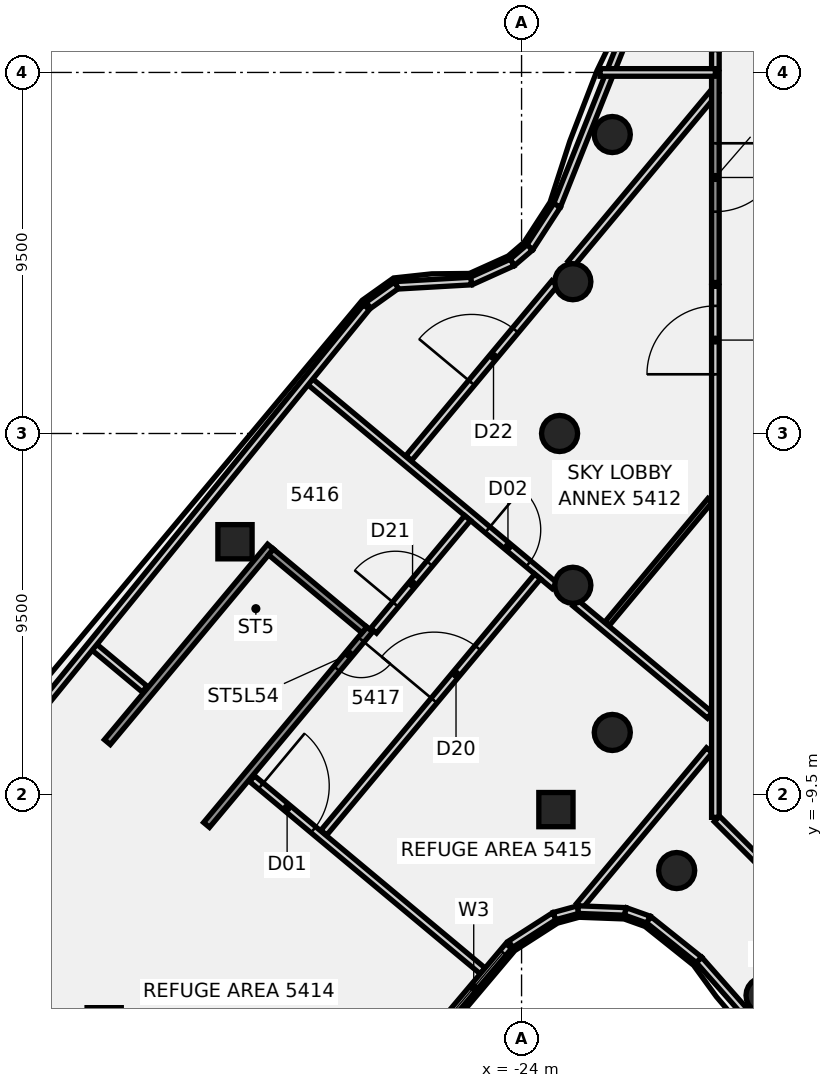
"""IFC4 building model, lengths in metres.
Left out: names, types, materials, properties, quantities, classifications, styles, units other than length and angle.
Written with IfcOpenShell. Run it as: python <this file> out.ifc"""

import sys

from ifc_helpers import new_model, si_unit, direction, frame, frame_2d, origin, origin_2d, place, context, subcontext, project, spatial, polyline, rectangle, circle, outline, extrude, element, fill, save


model = new_model("IFC4")
c1 = context("Model", 3, precision=1e-05, world=origin(), true_north=direction((0.0, 1.0)))
c2 = subcontext(c1, "Body", "Model", "MODEL_VIEW")
j1 = project(units=[si_unit("LENGTHUNIT", "METRE"), si_unit("PLANEANGLEUNIT", "RADIAN")], contexts=[c1])
p1 = place(None, origin())
s1 = spatial("IfcSite", under=j1, at=p1, CompositionType="ELEMENT")
p2 = place(p1, origin())
s2 = spatial("IfcBuilding", under=s1, at=p2, CompositionType="ELEMENT")
p3 = place(p2, frame((0.0, 0.0, 214.9)))
s3 = spatial("IfcBuildingStorey", under=s2, at=p3, CompositionType="ELEMENT", Elevation=214.9)
for number, where, z_axis, x_axis in (
    (1, (-21.613, 7.866, -0.18), (0.0, 0.0, 1.0), (1.0, 0.0, 0.0)),
    (2, (-22.651, 3.994, -0.18), (0.0, 0.0, 1.0), (1.0, 0.0, 0.0)),
    (3, (-23.0, 0.0, -0.18), (0.0, 0.0, 1.0), (1.0, 0.0, 0.0)),
    (4, (-22.651, -3.994, -0.18), (0.0, 0.0, 1.0), (1.0, 0.0, 0.0)),
    (5, (-21.613, -7.866, -0.18), (0.0, 0.0, 1.0), (1.0, 0.0, 0.0)),
    (6, (-19.919, -11.5, -0.18), (0.0, 0.0, 1.0), (1.0, 0.0, 0.0)),
    (7, (-17.619, -14.784, -0.18), (0.0, 0.0, 1.0), (1.0, 0.0, 0.0)),
):
    element("IfcColumn", number, at=place(p3, frame(where, z_axis=z_axis, x_axis=x_axis)), inside=s3, PredefinedType="COLUMN", context=c2, shape_type="SweptSolid", body=[
        extrude(circle(Radius=0.475, at=origin_2d()), origin(), (0.0, 0.0, 1.0), 5.04),
    ])
p4 = place(p3, frame((-23.096, -9.896, -0.174), z_axis=(0.03580550969, -0.00363877131, 0.999352152556), x_axis=(-0.767126989756, 0.640801875223, 0.029818422132)))
e8 = element("IfcColumn", 8, at=p4, inside=s3, PredefinedType="COLUMN", context=c2, shape_type="SweptSolid", body=[
    extrude(rectangle(XDim=0.9, YDim=0.9, at=origin_2d()), origin(), (0.0, 0.0, 1.0), 5.032),
])
p5 = place(p3, frame((-31.541, -2.848, -0.174), z_axis=(0.010576183279, -0.034396852958, 0.999352290663), x_axis=(0.641560817298, 0.766821630693, 0.019603683576)))
e9 = element("IfcColumn", 9, at=p5, inside=s3, PredefinedType="COLUMN", context=c2, shape_type="SweptSolid", body=[
    extrude(rectangle(XDim=0.9, YDim=0.9, at=origin_2d()), origin(), (0.0, 0.0, 1.0), 5.032),
])
p6 = place(p3, frame((-34.983, -15.557, -0.164), z_axis=(0.127416086189, 0.042488122715, 0.990938898423), x_axis=(-0.763161584743, 0.642340953018, 0.070586795141)))
e10 = element("IfcColumn", 10, at=p6, inside=s3, PredefinedType="COLUMN", context=c2, shape_type="SweptSolid", body=[
    extrude(rectangle(XDim=0.9, YDim=0.9, at=origin_2d()), origin(), (0.0, 0.0, 1.0), 5.057),
])
p7 = place(p3, frame((-18.858, -10.142, 0.0), z_axis=(0.0, 0.0, 1.0), x_axis=(0.707106781187, -0.707106781187, 0.0)))
e11 = element("IfcWall", 11, at=p7, inside=s3, PredefinedType="PARTITIONING", context=c2, shape_type="SweptSolid", body=[
    extrude(rectangle(XDim=2.426, YDim=0.2, at=frame_2d((1.213, 0.0))), origin(), (0.0, 0.0, 1.0), 4.16),
])
p8 = place(p3, frame((-35.345, -5.535, 0.0), z_axis=(0.0, 0.0, 1.0), x_axis=(0.767995139873, -0.640455669919, 0.0)))
e12 = element("IfcWall", 12, at=p8, inside=s3, PredefinedType="PARTITIONING", context=c2, shape_type="SweptSolid", body=[
    extrude(rectangle(XDim=1.859, YDim=0.2, at=frame_2d((0.929, 0.0))), origin(), (0.0, 0.0, 1.0), 4.16),
])
p9 = place(p3, frame((-31.091, -9.082, 0.0), z_axis=(0.0, 0.0, 1.0), x_axis=(0.768028712012, -0.640415410125, 0.0)))
e13 = element("IfcWall", 13, at=p9, inside=s3, PredefinedType="PARTITIONING", context=c2, shape_type="SweptSolid", body=[
    extrude(rectangle(XDim=7.899, YDim=0.2, at=frame_2d((3.95, 0.0))), origin(), (0.0, 0.0, 1.0), 4.16),
])
p10 = place(p9, frame((0.3, 0.0, 0.0)))
e14 = element("IfcOpeningElement", 14, at=p10, cuts=e13, PredefinedType="OPENING", context=c2, shape_type="SweptSolid", body=[
    extrude(rectangle(XDim=1.8, YDim=2.1, at=frame_2d((0.9, 1.05))), frame((0.0, 0.11, 0.0), z_axis=(0.0, -1.0, 0.0), x_axis=(1.0, 0.0, 0.0)), (0.0, 0.0, 1.0), 0.22),
])
p11 = place(p3, frame((-29.578, 1.375, 0.0), z_axis=(0.0, 0.0, 1.0), x_axis=(0.767770502141, -0.6407249457, 0.0)))
e15 = element("IfcWall", 15, at=p11, inside=s3, PredefinedType="PARTITIONING", context=c2, shape_type="SweptSolid", body=[
    extrude(rectangle(XDim=8.394, YDim=0.2, at=frame_2d((4.197, 0.0))), origin(), (0.0, 0.0, 1.0), 4.16),
])
p12 = place(p11, frame((6.099, 0.0, 0.0)))
e16 = element("IfcOpeningElement", 16, at=p12, cuts=e15, PredefinedType="OPENING", context=c2, shape_type="SweptSolid", body=[
    extrude(rectangle(XDim=1.4, YDim=2.1, at=frame_2d((0.7, 1.05))), frame((0.0, 0.11, 0.0), z_axis=(0.0, -1.0, 0.0), x_axis=(1.0, 0.0, 0.0)), (0.0, 0.0, 1.0), 0.22),
])
p13 = place(p3, frame((-22.584, -4.461, 0.0), z_axis=(0.0, 0.0, 1.0), x_axis=(0.767782587274, -0.640710463999, 0.0)))
e17 = element("IfcWall", 17, at=p13, inside=s3, PredefinedType="PARTITIONING", context=c2, shape_type="SweptSolid", body=[
    extrude(rectangle(XDim=4.609, YDim=0.2, at=frame_2d((2.305, 0.0))), origin(), (0.0, 0.0, 1.0), 4.16),
])
p14 = place(p3, frame((-29.204, -10.504, 0.0), z_axis=(0.0, 0.0, 1.0), x_axis=(0.640742157365, 0.767756138221, 0.0)))
e18 = element("IfcWall", 18, at=p14, inside=s3, PredefinedType="PARTITIONING", context=c2, shape_type="SweptSolid", body=[
    extrude(rectangle(XDim=8.781, YDim=0.2, at=frame_2d((4.39, 0.0))), origin(), (0.0, 0.0, 1.0), 4.16),
])
p15 = place(p14, frame((4.53, 0.0, 0.0)))
e19 = element("IfcOpeningElement", 19, at=p15, cuts=e18, PredefinedType="OPENING", context=c2, shape_type="SweptSolid", body=[
    extrude(rectangle(XDim=1.8, YDim=2.1, at=frame_2d((0.9, 1.05))), frame((0.0, 0.11, 0.0), z_axis=(0.0, -1.0, 0.0), x_axis=(1.0, 0.0, 0.0)), (0.0, 0.0, 1.0), 0.22),
])
p16 = place(p3, frame((-27.894, -5.188, 0.0), z_axis=(0.0, 0.0, 1.0), x_axis=(0.640750333898, 0.767749314301, 0.0)))
e20 = element("IfcWall", 20, at=p16, inside=s3, PredefinedType="PARTITIONING", context=c2, shape_type="SweptSolid", body=[
    extrude(rectangle(XDim=3.86, YDim=0.2, at=frame_2d((1.93, 0.0))), origin(), (0.0, 0.0, 1.0), 4.16),
])
p17 = place(p16, frame((0.9, 0.0, 0.0)))
e21 = element("IfcOpeningElement", 21, at=p17, cuts=e20, PredefinedType="OPENING", context=c2, shape_type="SweptSolid", body=[
    extrude(rectangle(XDim=1.4, YDim=2.1, at=frame_2d((0.7, 1.05))), frame((0.0, 0.11, 0.0), z_axis=(0.0, -1.0, 0.0), x_axis=(1.0, 0.0, 0.0)), (0.0, 0.0, 1.0), 0.22),
])
p18 = place(p3, frame((-26.968, -0.647, 0.0), z_axis=(0.0, 0.0, 1.0), x_axis=(0.640736859204, 0.767760559847, 0.0)))
e22 = element("IfcWall", 22, at=p18, inside=s3, PredefinedType="PARTITIONING", context=c2, shape_type="SweptSolid", body=[
    extrude(rectangle(XDim=5.997, YDim=0.2, at=frame_2d((2.998, 0.0))), origin(), (0.0, 0.0, 1.0), 4.16),
])
p19 = place(p18, frame((2.58, 0.0, 0.0)))
e23 = element("IfcOpeningElement", 23, at=p19, cuts=e22, PredefinedType="OPENING", context=c2, shape_type="SweptSolid", body=[
    extrude(rectangle(XDim=1.8, YDim=2.1, at=frame_2d((0.9, 1.05))), frame((0.0, 0.11, 0.0), z_axis=(0.0, -1.0, 0.0), x_axis=(1.0, 0.0, 0.0)), (0.0, 0.0, 1.0), 0.22),
])
p20 = place(p3, frame((-22.701, 4.465, 0.0), z_axis=(0.0, 0.0, 1.0), x_axis=(0.640775177537, 0.767728579547, 0.0)))
e24 = element("IfcWall", 24, at=p20, inside=s3, PredefinedType="PARTITIONING", context=c2, shape_type="SweptSolid", body=[
    extrude(rectangle(XDim=5.933, YDim=0.2, at=frame_2d((2.966, 0.0))), origin(), (0.0, 0.0, 1.0), 4.16),
])
p21 = place(p3, frame((-22.473, -12.428, 0.0), z_axis=(0.0, 0.0, 1.0), x_axis=(0.640675113455, 0.767812085734, 0.0)))
e25 = element("IfcWall", 25, at=p21, inside=s3, PredefinedType="PARTITIONING", context=c2, shape_type="SweptSolid", body=[
    extrude(rectangle(XDim=5.333, YDim=0.2, at=frame_2d((2.667, 0.0))), origin(), (0.0, 0.0, 1.0), 4.16),
])
p22 = place(p3, frame((-21.748, -5.004, 0.0), z_axis=(0.0, 0.0, 1.0), x_axis=(0.640814436724, 0.767695810647, 0.0)))
e26 = element("IfcWall", 26, at=p22, inside=s3, PredefinedType="PARTITIONING", context=c2, shape_type="SweptSolid", body=[
    extrude(rectangle(XDim=4.229, YDim=0.15, at=frame_2d((2.115, 0.0))), origin(), (0.0, 0.0, 1.0), 4.16),
])
p23 = place(p3, frame((-18.9, -10.1, 0.0), z_axis=(0.0, 0.0, 1.0), x_axis=(0.0, 1.0, 0.0)))
e27 = element("IfcWall", 27, at=p23, inside=s3, PredefinedType="PARTITIONING", context=c2, shape_type="SweptSolid", body=[
    extrude(rectangle(XDim=13.973, YDim=0.2, at=frame_2d((6.986, 0.0))), origin(), (0.0, 0.0, 1.0), 4.16),
])
p24 = place(p23, frame((11.658, 0.0, 0.0)))
e28 = element("IfcOpeningElement", 28, at=p24, cuts=e27, PredefinedType="OPENING", context=c2, shape_type="SweptSolid", body=[
    extrude(rectangle(XDim=1.8, YDim=2.1, at=frame_2d((0.9, 1.05))), frame((0.0, 0.11, 0.0), z_axis=(0.0, -1.0, 0.0), x_axis=(1.0, 0.0, 0.0)), (0.0, 0.0, 1.0), 0.22),
])
p25 = place(p3, frame((-18.9, 9.6, 0.0), z_axis=(0.0, 0.0, 1.0), x_axis=(0.0, 1.0, 0.0)))
e29 = element("IfcWall", 29, at=p25, inside=s3, PredefinedType="PARTITIONING", context=c2, shape_type="SweptSolid", body=[
    extrude(rectangle(XDim=0.5, YDim=0.2, at=frame_2d((0.25, 0.0))), origin(), (0.0, 0.0, 1.0), 4.16),
])
p26 = place(p3, frame((-39.85, -13.687, 0.0), z_axis=(0.0, 0.0, 1.0), x_axis=(0.78216217296, -0.623074903355, 0.0)))
e30 = element("IfcWall", 30, at=p26, inside=s3, PredefinedType="SOLIDWALL", context=c2, shape_type="SweptSolid", body=[
    extrude(rectangle(XDim=10.833, YDim=0.2, at=frame_2d((5.417, 0.0))), origin(), (0.0, 0.0, 1.0), 4.86),
])
p27 = place(p26, frame((8.233, 0.0, 1.4)))
e31 = element("IfcOpeningElement", 31, at=p27, cuts=e30, PredefinedType="OPENING", context=c2, shape_type="SweptSolid", body=[
    extrude(rectangle(XDim=2.4, YDim=2.1, at=frame_2d((1.2, 1.05))), frame((0.0, 0.11, 0.0), z_axis=(0.0, -1.0, 0.0), x_axis=(1.0, 0.0, 0.0)), (0.0, 0.0, 1.0), 0.22),
])
p28 = place(p3, frame((-29.645, -19.772, 0.0), z_axis=(0.0, 0.0, 1.0), x_axis=(0.64498793917, 0.764192749459, 0.0)))
e32 = element("IfcWall", 32, at=p28, inside=s3, PredefinedType="SOLIDWALL", context=c2, shape_type="SweptSolid", body=[
    extrude(rectangle(XDim=8.227, YDim=0.2, at=frame_2d((4.114, 0.0))), origin(), (0.0, 0.0, 1.0), 4.86),
])
p29 = place(p28, frame((5.6, 0.0, 1.4)))
e33 = element("IfcOpeningElement", 33, at=p29, cuts=e32, PredefinedType="OPENING", context=c2, shape_type="SweptSolid", body=[
    extrude(rectangle(XDim=2.4, YDim=2.1, at=frame_2d((1.2, 1.05))), frame((0.0, 0.11, 0.0), z_axis=(0.0, -1.0, 0.0), x_axis=(1.0, 0.0, 0.0)), (0.0, 0.0, 1.0), 0.22),
])
p30 = place(p3, frame((-24.287, -13.438, 0.0), z_axis=(0.0, 0.0, 1.0), x_axis=(0.841444816205, 0.540343058881, 0.0)))
e34 = element("IfcWall", 34, at=p30, inside=s3, PredefinedType="SOLIDWALL", context=c2, shape_type="SweptSolid", body=[
    extrude(rectangle(XDim=1.369, YDim=0.2, at=frame_2d((0.685, 0.0))), origin(), (0.0, 0.0, 1.0), 4.86),
])
p31 = place(p3, frame((-23.135, -12.698, 0.0), z_axis=(0.0, 0.0, 1.0), x_axis=(0.964650465648, 0.263532690811, 0.0)))
e35 = element("IfcWall", 35, at=p31, inside=s3, PredefinedType="SOLIDWALL", context=c2, shape_type="SweptSolid", body=[
    extrude(rectangle(XDim=0.647, YDim=0.2, at=frame_2d((0.323, 0.0))), origin(), (0.0, 0.0, 1.0), 4.86),
])
p32 = place(p3, frame((-22.511, -12.528, 0.0), z_axis=(0.0, 0.0, 1.0), x_axis=(0.999291824477, -0.037627776093, 0.0)))
e36 = element("IfcWall", 36, at=p32, inside=s3, PredefinedType="SOLIDWALL", context=c2, shape_type="SweptSolid", body=[
    extrude(rectangle(XDim=1.246, YDim=0.2, at=frame_2d((0.623, 0.0))), origin(), (0.0, 0.0, 1.0), 4.86),
])
p33 = place(p3, frame((-21.266, -12.575, 0.0), z_axis=(0.0, 0.0, 1.0), x_axis=(0.9419797958, -0.335669576077, 0.0)))
e37 = element("IfcWall", 37, at=p33, inside=s3, PredefinedType="SOLIDWALL", context=c2, shape_type="SweptSolid", body=[
    extrude(rectangle(XDim=0.649, YDim=0.2, at=frame_2d((0.325, 0.0))), origin(), (0.0, 0.0, 1.0), 4.86),
])
p34 = place(p3, frame((-20.655, -12.793, 0.0), z_axis=(0.0, 0.0, 1.0), x_axis=(0.781177323264, -0.624309209942, 0.0)))
e38 = element("IfcWall", 38, at=p34, inside=s3, PredefinedType="SOLIDWALL", context=c2, shape_type="SweptSolid", body=[
    extrude(rectangle(XDim=1.698, YDim=0.2, at=frame_2d((0.849, 0.0))), origin(), (0.0, 0.0, 1.0), 4.86),
])
p35 = place(p3, frame((-19.328, -13.853, 0.0), z_axis=(0.0, 0.0, 1.0), x_axis=(0.661797193019, -0.749682916513, 0.0)))
e39 = element("IfcWall", 39, at=p35, inside=s3, PredefinedType="SOLIDWALL", context=c2, shape_type="SweptSolid", body=[
    extrude(rectangle(XDim=4.967, YDim=0.2, at=frame_2d((2.483, 0.0))), origin(), (0.0, 0.0, 1.0), 4.86),
])
p36 = place(p35, frame((2.05, 0.0, 1.4)))
e40 = element("IfcOpeningElement", 40, at=p36, cuts=e39, PredefinedType="OPENING", context=c2, shape_type="SweptSolid", body=[
    extrude(rectangle(XDim=2.4, YDim=2.1, at=frame_2d((1.2, 1.05))), frame((0.0, 0.11, 0.0), z_axis=(0.0, -1.0, 0.0), x_axis=(1.0, 0.0, 0.0)), (0.0, 0.0, 1.0), 0.22),
])
p37 = place(p3, frame((-20.976, 11.235, 0.0), z_axis=(0.0, 0.0, 1.0), x_axis=(-0.370957476811, -0.928649853496, 0.0)))
e41 = element("IfcWall", 41, at=p37, inside=s3, PredefinedType="SOLIDWALL", context=c2, shape_type="SweptSolid", body=[
    extrude(rectangle(XDim=5.636, YDim=0.2, at=frame_2d((2.818, 0.0))), origin(), (0.0, 0.0, 1.0), 4.86),
])
p38 = place(p3, frame((-23.067, 6.001, 0.0), z_axis=(0.0, 0.0, 1.0), x_axis=(-0.543951096274, -0.839116919662, 0.0)))
e42 = element("IfcWall", 42, at=p38, inside=s3, PredefinedType="SOLIDWALL", context=c2, shape_type="SweptSolid", body=[
    extrude(rectangle(XDim=1.316, YDim=0.2, at=frame_2d((0.658, 0.0))), origin(), (0.0, 0.0, 1.0), 4.86),
])
p39 = place(p3, frame((-23.783, 4.897, 0.0), z_axis=(0.0, 0.0, 1.0), x_axis=(-0.758719364192, -0.651417628254, 0.0)))
e43 = element("IfcWall", 43, at=p39, inside=s3, PredefinedType="SOLIDWALL", context=c2, shape_type="SweptSolid", body=[
    extrude(rectangle(XDim=0.61, YDim=0.2, at=frame_2d((0.305, 0.0))), origin(), (0.0, 0.0, 1.0), 4.86),
])
p40 = place(p3, frame((-24.246, 4.5, 0.0), z_axis=(0.0, 0.0, 1.0), x_axis=(-0.911490011806, -0.411322207494, 0.0)))
e44 = element("IfcWall", 44, at=p40, inside=s3, PredefinedType="SOLIDWALL", context=c2, shape_type="SweptSolid", body=[
    extrude(rectangle(XDim=1.187, YDim=0.2, at=frame_2d((0.594, 0.0))), origin(), (0.0, 0.0, 1.0), 4.86),
])
p41 = place(p3, frame((-25.328, 4.011, 0.0), z_axis=(0.0, 0.0, 1.0), x_axis=(-0.998367905446, -0.057109766027, 0.0)))
e45 = element("IfcWall", 45, at=p41, inside=s3, PredefinedType="SOLIDWALL", context=c2, shape_type="SweptSolid", body=[
    extrude(rectangle(XDim=1.971, YDim=0.2, at=frame_2d((0.985, 0.0))), origin(), (0.0, 0.0, 1.0), 4.86),
])
p42 = place(p3, frame((-27.295, 3.899, 0.0), z_axis=(0.0, 0.0, 1.0), x_axis=(-0.814189379779, -0.580599391883, 0.0)))
e46 = element("IfcWall", 46, at=p42, inside=s3, PredefinedType="SOLIDWALL", context=c2, shape_type="SweptSolid", body=[
    extrude(rectangle(XDim=0.904, YDim=0.2, at=frame_2d((0.452, 0.0))), origin(), (0.0, 0.0, 1.0), 4.86),
])
p43 = place(p3, frame((-28.081, 3.326, 0.0), z_axis=(0.0, 0.0, 1.0), x_axis=(-0.631092649572, -0.775707462679, 0.0)))
e47 = element("IfcWall", 47, at=p43, inside=s3, PredefinedType="SOLIDWALL", context=c2, shape_type="SweptSolid", body=[
    extrude(rectangle(XDim=19.7, YDim=0.2, at=frame_2d((9.85, 0.0))), origin(), (0.0, 0.0, 1.0), 4.86),
])
p44 = place(p3, frame((-18.9, 9.5, 0.0), z_axis=(0.0, 0.0, 1.0), x_axis=(0.0, -1.0, 0.0)))
e48 = element("IfcWall", 48, at=p44, inside=s3, PredefinedType="SOLIDWALL", context=c2, shape_type="SweptSolid", body=[
    extrude(rectangle(XDim=5.527, YDim=0.2, at=frame_2d((2.764, 0.0))), origin(), (0.0, 0.0, 1.0), 4.364),
])
p45 = place(p44, frame((1.864, 0.0, 0.0)))
e49 = element("IfcOpeningElement", 49, at=p45, cuts=e48, PredefinedType="OPENING", context=c2, shape_type="SweptSolid", body=[
    extrude(rectangle(XDim=1.8, YDim=2.4, at=frame_2d((0.9, 1.2))), frame((0.0, 0.11, 0.0), z_axis=(0.0, -1.0, 0.0), x_axis=(1.0, 0.0, 0.0)), (0.0, 0.0, 1.0), 0.22),
])
p46 = place(p3, frame((-18.9, 9.5, 0.0), z_axis=(0.0, 0.0, 1.0), x_axis=(-1.0, 0.0, 0.0)))
e50 = element("IfcWall", 50, at=p46, inside=s3, PredefinedType="SOLIDWALL", context=c2, shape_type="SweptSolid", body=[
    extrude(rectangle(XDim=3.033, YDim=0.2, at=frame_2d((1.517, 0.0))), origin(), (0.0, 0.0, 1.0), 4.86),
])
p47 = place(p3, frame((-27.996, -5.155, -0.18), z_axis=(0.0, 0.0, 1.0), x_axis=(-0.640775593129, -0.767728232678, 0.0)))
e51 = element("IfcWall", 51, at=p47, inside=s3, PredefinedType="SHEAR", context=c2, shape_type="SweptSolid", body=[
    extrude(rectangle(XDim=6.7, YDim=0.2, at=frame_2d((3.35, 0.0))), origin(), (0.0, 0.0, 1.0), 4.444),
])
p48 = place(p47, frame((0.35, 0.0, 0.0)))
e52 = element("IfcOpeningElement", 52, at=p48, cuts=e51, PredefinedType="OPENING", context=c2, shape_type="SweptSolid", body=[
    extrude(rectangle(XDim=1.0, YDim=2.1, at=frame_2d((0.5, 1.05))), frame((0.0, 0.11, 0.0), z_axis=(0.0, -1.0, 0.0), x_axis=(1.0, 0.0, 0.0)), (0.0, 0.0, 1.0), 0.22),
])
p49 = place(p3, frame((-30.606, -2.977, -0.18), z_axis=(0.0, 0.0, 1.0), x_axis=(-0.640775593129, -0.767728232678, 0.0)))
e53 = element("IfcWall", 53, at=p49, inside=s3, PredefinedType="SHEAR", context=c2, shape_type="SweptSolid", body=[
    extrude(rectangle(XDim=6.7, YDim=0.2, at=frame_2d((3.35, 0.0))), origin(), (0.0, 0.0, 1.0), 4.444),
])
p50 = place(p3, frame((-30.594, -3.117, -0.18), z_axis=(0.0, 0.0, 1.0), x_axis=(0.767727028485, -0.640777035898, 0.0)))
e54 = element("IfcWall", 54, at=p50, inside=s3, PredefinedType="SHEAR", context=c2, shape_type="SweptSolid", body=[
    extrude(rectangle(XDim=3.2, YDim=0.2, at=frame_2d((1.6, 0.0))), origin(), (0.0, 0.0, 1.0), 4.444),
])
p51 = place(p3, frame((0.0, 0.0, -0.18)))
e55 = element("IfcWall", 55, at=p51, inside=s3, PredefinedType="SHEAR", context=c2, shape_type="SweptSolid", body=[
    extrude(outline(polyline([(-34.695, -8.031), (-34.823, -8.185), (-32.366, -10.235), (-32.238, -10.081), (-34.695, -8.031)])), origin(), (0.0, 0.0, 1.0), 4.444),
])
p52 = place(p10, frame((1.8, 0.0, 0.0), z_axis=(0.0, 0.0, 1.0), x_axis=(-1.0, 0.0, 0.0)))
e56 = element("IfcDoor", 56, at=p52, inside=s3, OperationType="DOUBLE_DOOR_SINGLE_SWING", PredefinedType="DOOR", context=c2, shape_type="SweptSolid", body=[
    extrude(rectangle(XDim=1.8, YDim=2.1, at=frame_2d((0.9, 1.05))), frame((0.0, 0.025, 0.0), z_axis=(0.0, -1.0, 0.0), x_axis=(1.0, 0.0, 0.0)), (0.0, 0.0, 1.0), 0.05),
])
fill(e14, e56)
p53 = place(p12, origin())
e57 = element("IfcDoor", 57, at=p53, inside=s3, OperationType="DOUBLE_DOOR_SINGLE_SWING", PredefinedType="DOOR", context=c2, shape_type="SweptSolid", body=[
    extrude(rectangle(XDim=1.4, YDim=2.1, at=frame_2d((0.7, 1.05))), frame((0.0, 0.025, 0.0), z_axis=(0.0, -1.0, 0.0), x_axis=(1.0, 0.0, 0.0)), (0.0, 0.0, 1.0), 0.05),
])
fill(e16, e57)
p54 = place(p15, frame((1.8, 0.0, 0.0), z_axis=(0.0, 0.0, 1.0), x_axis=(-1.0, 0.0, 0.0)))
e58 = element("IfcDoor", 58, at=p54, inside=s3, OperationType="DOUBLE_DOOR_SINGLE_SWING", PredefinedType="DOOR", context=c2, shape_type="SweptSolid", body=[
    extrude(rectangle(XDim=1.8, YDim=2.1, at=frame_2d((0.9, 1.05))), frame((0.0, 0.025, 0.0), z_axis=(0.0, -1.0, 0.0), x_axis=(1.0, 0.0, 0.0)), (0.0, 0.0, 1.0), 0.05),
])
fill(e19, e58)
p55 = place(p17, origin())
e59 = element("IfcDoor", 59, at=p55, inside=s3, OperationType="DOUBLE_DOOR_SINGLE_SWING", PredefinedType="DOOR", context=c2, shape_type="SweptSolid", body=[
    extrude(rectangle(XDim=1.4, YDim=2.1, at=frame_2d((0.7, 1.05))), frame((0.0, 0.025, 0.0), z_axis=(0.0, -1.0, 0.0), x_axis=(1.0, 0.0, 0.0)), (0.0, 0.0, 1.0), 0.05),
])
fill(e21, e59)
p56 = place(p19, origin())
e60 = element("IfcDoor", 60, at=p56, inside=s3, OperationType="DOUBLE_DOOR_SINGLE_SWING", PredefinedType="DOOR", context=c2, shape_type="SweptSolid", body=[
    extrude(rectangle(XDim=1.8, YDim=2.1, at=frame_2d((0.9, 1.05))), frame((0.0, 0.025, 0.0), z_axis=(0.0, -1.0, 0.0), x_axis=(1.0, 0.0, 0.0)), (0.0, 0.0, 1.0), 0.05),
])
fill(e23, e60)
p57 = place(p24, frame((1.8, 0.0, 0.0), z_axis=(0.0, 0.0, 1.0), x_axis=(-1.0, 0.0, 0.0)))
e61 = element("IfcDoor", 61, at=p57, inside=s3, OperationType="DOUBLE_DOOR_SINGLE_SWING", PredefinedType="DOOR", context=c2, shape_type="SweptSolid", body=[
    extrude(rectangle(XDim=1.8, YDim=2.1, at=frame_2d((0.9, 1.05))), frame((0.0, 0.025, 0.0), z_axis=(0.0, -1.0, 0.0), x_axis=(1.0, 0.0, 0.0)), (0.0, 0.0, 1.0), 0.05),
])
fill(e28, e61)
p58 = place(p29, origin())
e62 = element("IfcWindow", 62, at=p58, inside=s3, PartitioningType="SINGLE_PANEL", PredefinedType="WINDOW", context=c2, shape_type="SweptSolid", body=[
    extrude(rectangle(XDim=2.4, YDim=2.1, at=frame_2d((1.2, 1.05))), frame((0.0, 0.03, 0.0), z_axis=(0.0, -1.0, 0.0), x_axis=(1.0, 0.0, 0.0)), (0.0, 0.0, 1.0), 0.06),
])
fill(e33, e62)
p59 = place(p45, origin())
e63 = element("IfcDoor", 63, at=p59, inside=s3, OperationType="SINGLE_SWING_LEFT", PredefinedType="DOOR", context=c2, shape_type="SweptSolid", body=[
    extrude(rectangle(XDim=1.8, YDim=2.4, at=frame_2d((0.9, 1.2))), frame((0.0, 0.025, 0.0), z_axis=(0.0, -1.0, 0.0), x_axis=(1.0, 0.0, 0.0)), (0.0, 0.0, 1.0), 0.05),
])
fill(e49, e63)
p60 = place(p48, origin())
e64 = element("IfcDoor", 64, at=p60, inside=s3, OperationType="SINGLE_SWING_LEFT", PredefinedType="DOOR", context=c2, shape_type="SweptSolid", body=[
    extrude(rectangle(XDim=1.0, YDim=2.1, at=frame_2d((0.5, 1.05))), frame((0.0, 0.025, 0.0), z_axis=(0.0, -1.0, 0.0), x_axis=(1.0, 0.0, 0.0)), (0.0, 0.0, 1.0), 0.05),
])
fill(e52, e64)
save(model, sys.argv[1])
